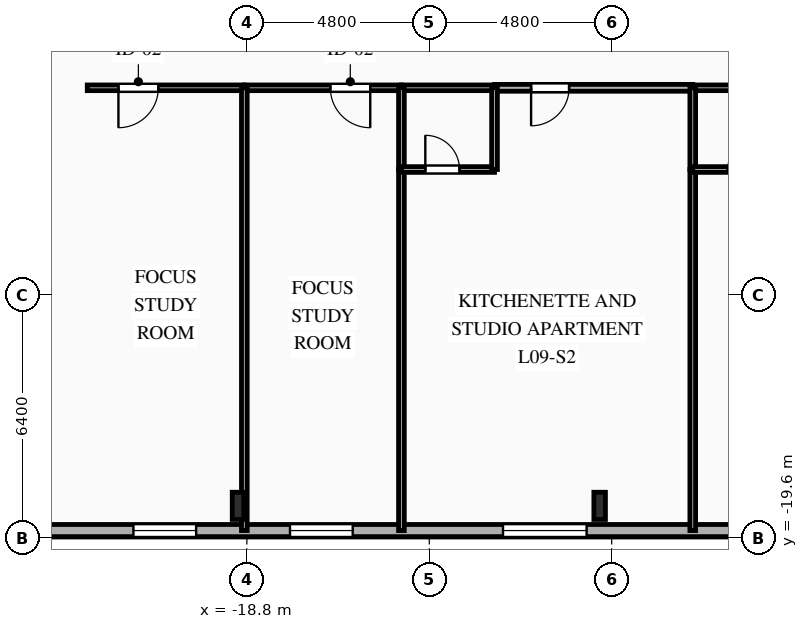
"""IFC4 building model, lengths in metres.
Left out: names, types, materials, properties, quantities, classifications, styles, units other than length and angle.
Written with IfcOpenShell. Run it as: python <this file> out.ifc"""

import sys

from ifc_helpers import new_model, si_unit, direction, frame, frame_2d, origin, origin_2d, place, context, subcontext, project, spatial, rectangle, i_section, extrude, element, fill, save


model = new_model("IFC4")
c1 = context("Model", 3, precision=1e-05, world=origin(), true_north=direction((0.0, 1.0)))
c2 = subcontext(c1, "Body", "Model", "MODEL_VIEW")
j1 = project(units=[si_unit("LENGTHUNIT", "METRE"), si_unit("PLANEANGLEUNIT", "RADIAN")], contexts=[c1])
p1 = place(None, origin())
s1 = spatial("IfcSite", under=j1, at=p1, CompositionType="ELEMENT")
p2 = place(p1, origin())
s2 = spatial("IfcBuilding", under=s1, at=p2, CompositionType="ELEMENT")
p3 = place(p2, frame((0.0, 0.0, 37.05)))
s3 = spatial("IfcBuildingStorey", under=s2, at=p3, CompositionType="ELEMENT", Elevation=37.05)
for number, where, z_axis, x_axis in (
    (1, (-19.033, -18.75, 0.0), (0.0, 0.0, 1.0), (1.0, 0.0, 0.0)),
    (2, (-9.517, -18.75, 0.0), (0.0, 0.0, 1.0), (1.0, 0.0, 0.0)),
):
    element("IfcColumn", number, at=place(p3, frame(where, z_axis=z_axis, x_axis=x_axis)), inside=s3, PredefinedType="COLUMN", context=c2, shape_type="SweptSolid", body=[
        extrude(i_section(OverallWidth=0.304, OverallDepth=0.716, WebThickness=0.021, FlangeThickness=0.04, FilletRadius=0.027, at=origin_2d()), origin(), (0.0, 0.0, 1.0), 3.35),
    ])
p4 = place(p3, frame((29.2, -19.4, 0.0), z_axis=(0.0, 0.0, 1.0), x_axis=(-1.0, 0.0, 0.0)))
e3 = element("IfcWall", 3, at=p4, inside=s3, PredefinedType="SOLIDWALL", context=c2, shape_type="SweptSolid", body=[
    extrude(rectangle(XDim=58.4, YDim=0.32, at=frame_2d((29.2, 0.0))), origin(), (0.0, 0.0, 1.0), 3.035),
])
p5 = place(p4, frame((3.055, 0.0, 0.85)))
e4 = element("IfcOpeningElement", 4, at=p5, cuts=e3, PredefinedType="OPENING", context=c2, shape_type="SweptSolid", body=[
    extrude(rectangle(XDim=1.65, YDim=1.85, at=frame_2d((0.825, 0.925))), frame((0.0, 0.17, 0.0), z_axis=(0.0, -1.0, 0.0), x_axis=(1.0, 0.0, 0.0)), (0.0, 0.0, 1.0), 0.34),
])
p6 = place(p4, frame((7.175, 0.0, 0.85)))
e5 = element("IfcOpeningElement", 5, at=p6, cuts=e3, PredefinedType="OPENING", context=c2, shape_type="SweptSolid", body=[
    extrude(rectangle(XDim=1.65, YDim=1.85, at=frame_2d((0.825, 0.925))), frame((0.0, 0.17, 0.0), z_axis=(0.0, -1.0, 0.0), x_axis=(1.0, 0.0, 0.0)), (0.0, 0.0, 1.0), 0.34),
])
p7 = place(p4, frame((10.695, 0.0, 0.85)))
e6 = element("IfcOpeningElement", 6, at=p7, cuts=e3, PredefinedType="OPENING", context=c2, shape_type="SweptSolid", body=[
    extrude(rectangle(XDim=1.65, YDim=1.85, at=frame_2d((0.825, 0.925))), frame((0.0, 0.17, 0.0), z_axis=(0.0, -1.0, 0.0), x_axis=(1.0, 0.0, 0.0)), (0.0, 0.0, 1.0), 0.34),
])
p8 = place(p4, frame((16.02, 0.0, 0.85)))
e7 = element("IfcOpeningElement", 7, at=p8, cuts=e3, PredefinedType="OPENING", context=c2, shape_type="SweptSolid", body=[
    extrude(rectangle(XDim=2.2, YDim=1.85, at=frame_2d((1.1, 0.925))), frame((0.0, 0.17, 0.0), z_axis=(0.0, -1.0, 0.0), x_axis=(1.0, 0.0, 0.0)), (0.0, 0.0, 1.0), 0.34),
])
p9 = place(p4, frame((23.7, 0.0, 0.85)))
e8 = element("IfcOpeningElement", 8, at=p9, cuts=e3, PredefinedType="OPENING", context=c2, shape_type="SweptSolid", body=[
    extrude(rectangle(XDim=2.2, YDim=1.85, at=frame_2d((1.1, 0.925))), frame((0.0, 0.17, 0.0), z_axis=(0.0, -1.0, 0.0), x_axis=(1.0, 0.0, 0.0)), (0.0, 0.0, 1.0), 0.34),
])
p10 = place(p4, frame((31.38, 0.0, 0.85)))
e9 = element("IfcOpeningElement", 9, at=p10, cuts=e3, PredefinedType="OPENING", context=c2, shape_type="SweptSolid", body=[
    extrude(rectangle(XDim=2.2, YDim=1.85, at=frame_2d((1.1, 0.925))), frame((0.0, 0.17, 0.0), z_axis=(0.0, -1.0, 0.0), x_axis=(1.0, 0.0, 0.0)), (0.0, 0.0, 1.0), 0.34),
])
p11 = place(p4, frame((39.06, 0.0, 0.85)))
e10 = element("IfcOpeningElement", 10, at=p11, cuts=e3, PredefinedType="OPENING", context=c2, shape_type="SweptSolid", body=[
    extrude(rectangle(XDim=2.2, YDim=1.85, at=frame_2d((1.1, 0.925))), frame((0.0, 0.17, 0.0), z_axis=(0.0, -1.0, 0.0), x_axis=(1.0, 0.0, 0.0)), (0.0, 0.0, 1.0), 0.34),
])
p12 = place(p4, frame((45.215, 0.0, 0.85)))
e11 = element("IfcOpeningElement", 11, at=p12, cuts=e3, PredefinedType="OPENING", context=c2, shape_type="SweptSolid", body=[
    extrude(rectangle(XDim=1.65, YDim=1.85, at=frame_2d((0.825, 0.925))), frame((0.0, 0.17, 0.0), z_axis=(0.0, -1.0, 0.0), x_axis=(1.0, 0.0, 0.0)), (0.0, 0.0, 1.0), 0.34),
])
p13 = place(p4, frame((49.335, 0.0, 0.85)))
e12 = element("IfcOpeningElement", 12, at=p13, cuts=e3, PredefinedType="OPENING", context=c2, shape_type="SweptSolid", body=[
    extrude(rectangle(XDim=1.65, YDim=1.85, at=frame_2d((0.825, 0.925))), frame((0.0, 0.17, 0.0), z_axis=(0.0, -1.0, 0.0), x_axis=(1.0, 0.0, 0.0)), (0.0, 0.0, 1.0), 0.34),
])
p14 = place(p3, frame((-18.866, -7.75, 0.0), z_axis=(0.0, 0.0, 1.0), x_axis=(-1.0, 0.0, 0.0)))
e13 = element("IfcWall", 13, at=p14, inside=s3, PredefinedType="PARTITIONING", context=c2, shape_type="SweptSolid", body=[
    extrude(rectangle(XDim=4.134, YDim=0.15, at=frame_2d((2.067, 0.0))), origin(), (0.0, 0.0, 1.0), 3.035),
])
p15 = place(p14, frame((2.263, 0.0, 0.0)))
e14 = element("IfcOpeningElement", 14, at=p15, cuts=e13, PredefinedType="OPENING", context=c2, shape_type="SweptSolid", body=[
    extrude(rectangle(XDim=1.05, YDim=2.15, at=frame_2d((0.525, 1.075))), frame((0.0, 0.085, 0.0), z_axis=(0.0, -1.0, 0.0), x_axis=(1.0, 0.0, 0.0)), (0.0, 0.0, 1.0), 0.17),
])
p16 = place(p3, frame((-14.733, -7.75, 0.0), z_axis=(0.0, 0.0, 1.0), x_axis=(-1.0, 0.0, 0.0)))
e15 = element("IfcWall", 15, at=p16, inside=s3, PredefinedType="PARTITIONING", context=c2, shape_type="SweptSolid", body=[
    extrude(rectangle(XDim=4.134, YDim=0.15, at=frame_2d((2.067, 0.0))), origin(), (0.0, 0.0, 1.0), 3.035),
])
p17 = place(p16, frame((0.82, 0.0, 0.0)))
e16 = element("IfcOpeningElement", 16, at=p17, cuts=e15, PredefinedType="OPENING", context=c2, shape_type="SweptSolid", body=[
    extrude(rectangle(XDim=1.05, YDim=2.15, at=frame_2d((0.525, 1.075))), frame((0.0, 0.085, 0.0), z_axis=(0.0, -1.0, 0.0), x_axis=(1.0, 0.0, 0.0)), (0.0, 0.0, 1.0), 0.17),
])
p18 = place(p3, frame((-7.067, -7.75, 0.0), z_axis=(0.0, 0.0, 1.0), x_axis=(-1.0, 0.0, 0.0)))
e17 = element("IfcWall", 17, at=p18, inside=s3, PredefinedType="PARTITIONING", context=c2, shape_type="SweptSolid", body=[
    extrude(rectangle(XDim=5.216, YDim=0.18, at=frame_2d((2.608, 0.0))), origin(), (0.0, 0.0, 1.0), 3.035),
])
p19 = place(p18, frame((3.254, 0.0, 0.0)))
e18 = element("IfcOpeningElement", 18, at=p19, cuts=e17, PredefinedType="OPENING", context=c2, shape_type="SweptSolid", body=[
    extrude(rectangle(XDim=1.0, YDim=2.15, at=frame_2d((0.5, 1.075))), frame((0.0, 0.1, 0.0), z_axis=(0.0, -1.0, 0.0), x_axis=(1.0, 0.0, 0.0)), (0.0, 0.0, 1.0), 0.2),
])
for number, where, z_axis, x_axis in (
    (19, (-12.283, -7.75, 0.0), (0.0, 0.0, 1.0), (-1.0, 0.0, 0.0)),
    (20, (-4.617, -7.75, 0.0), (0.0, 0.0, 1.0), (-1.0, 0.0, 0.0)),
):
    element("IfcWall", number, at=place(p3, frame(where, z_axis=z_axis, x_axis=x_axis)), inside=s3, PredefinedType="PLUMBINGWALL", context=c2, shape_type="SweptSolid", body=[
        extrude(rectangle(XDim=2.45, YDim=0.15, at=frame_2d((1.225, 0.0))), origin(), (0.0, 0.0, 1.0), 3.035),
    ])
p20 = place(p3, frame((-18.866, -7.75, 0.0), z_axis=(0.0, 0.0, 1.0), x_axis=(0.0, -1.0, 0.0)))
e21 = element("IfcWall", 21, at=p20, inside=s3, PredefinedType="PARTITIONING", context=c2, shape_type="SweptSolid", body=[
    extrude(rectangle(XDim=11.65, YDim=0.15, at=frame_2d((5.825, 0.0))), origin(), (0.0, 0.0, 1.0), 2.52),
])
p21 = place(p3, frame((-14.733, -9.9, 0.0), z_axis=(0.0, 0.0, 1.0), x_axis=(0.0, -1.0, 0.0)))
e22 = element("IfcWall", 22, at=p21, inside=s3, PredefinedType="PARTITIONING", context=c2, shape_type="SweptSolid", body=[
    extrude(rectangle(XDim=9.5, YDim=0.15, at=frame_2d((4.75, 0.0))), origin(), (0.0, 0.0, 1.0), 3.035),
])
p22 = place(p3, frame((-14.733, -7.75, 0.0), z_axis=(0.0, 0.0, 1.0), x_axis=(0.0, -1.0, 0.0)))
e23 = element("IfcWall", 23, at=p22, inside=s3, PredefinedType="PLUMBINGWALL", context=c2, shape_type="SweptSolid", body=[
    extrude(rectangle(XDim=2.15, YDim=0.15, at=frame_2d((1.075, 0.0))), origin(), (0.0, 0.0, 1.0), 3.035),
])
p23 = place(p3, frame((-14.733, -9.9, 0.0), z_axis=(0.0, 0.0, 1.0), x_axis=(1.0, 0.0, 0.0)))
e24 = element("IfcWall", 24, at=p23, inside=s3, PredefinedType="PLUMBINGWALL", context=c2, shape_type="SweptSolid", body=[
    extrude(rectangle(XDim=2.45, YDim=0.15, at=frame_2d((1.225, 0.0))), origin(), (0.0, 0.0, 1.0), 3.035),
])
p24 = place(p23, frame((0.629, 0.0, 0.0)))
e25 = element("IfcOpeningElement", 25, at=p24, cuts=e24, PredefinedType="OPENING", context=c2, shape_type="SweptSolid", body=[
    extrude(rectangle(XDim=0.9, YDim=2.1, at=frame_2d((0.45, 1.05))), frame((0.0, 0.085, 0.0), z_axis=(0.0, -1.0, 0.0), x_axis=(1.0, 0.0, 0.0)), (0.0, 0.0, 1.0), 0.17),
])
p25 = place(p3, frame((-12.283, -9.9, 0.0), z_axis=(0.0, 0.0, 1.0), x_axis=(0.0, 1.0, 0.0)))
e26 = element("IfcWall", 26, at=p25, inside=s3, PredefinedType="PLUMBINGWALL", context=c2, shape_type="SweptSolid", body=[
    extrude(rectangle(XDim=2.15, YDim=0.15, at=frame_2d((1.075, 0.0))), origin(), (0.0, 0.0, 1.0), 3.035),
])
p26 = place(p3, frame((-7.067, -9.9, 0.0), z_axis=(0.0, 0.0, 1.0), x_axis=(0.0, -1.0, 0.0)))
e27 = element("IfcWall", 27, at=p26, inside=s3, PredefinedType="PARTITIONING", context=c2, shape_type="SweptSolid", body=[
    extrude(rectangle(XDim=9.5, YDim=0.15, at=frame_2d((4.75, 0.0))), origin(), (0.0, 0.0, 1.0), 3.035),
])
p27 = place(p3, frame((-7.067, -7.75, 0.0), z_axis=(0.0, 0.0, 1.0), x_axis=(0.0, -1.0, 0.0)))
e28 = element("IfcWall", 28, at=p27, inside=s3, PredefinedType="PLUMBINGWALL", context=c2, shape_type="SweptSolid", body=[
    extrude(rectangle(XDim=2.15, YDim=0.15, at=frame_2d((1.075, 0.0))), origin(), (0.0, 0.0, 1.0), 3.035),
])
p28 = place(p3, frame((-7.067, -9.9, 0.0), z_axis=(0.0, 0.0, 1.0), x_axis=(1.0, 0.0, 0.0)))
e29 = element("IfcWall", 29, at=p28, inside=s3, PredefinedType="PLUMBINGWALL", context=c2, shape_type="SweptSolid", body=[
    extrude(rectangle(XDim=2.45, YDim=0.15, at=frame_2d((1.225, 0.0))), origin(), (0.0, 0.0, 1.0), 3.035),
])
p29 = place(p28, frame((0.921, 0.0, 0.0)))
e30 = element("IfcOpeningElement", 30, at=p29, cuts=e29, PredefinedType="OPENING", context=c2, shape_type="SweptSolid", body=[
    extrude(rectangle(XDim=0.9, YDim=2.1, at=frame_2d((0.45, 1.05))), frame((0.0, 0.085, 0.0), z_axis=(0.0, -1.0, 0.0), x_axis=(1.0, 0.0, 0.0)), (0.0, 0.0, 1.0), 0.17),
])
p30 = place(p11, origin())
e31 = element("IfcWindow", 31, at=p30, inside=s3, PartitioningType="SINGLE_PANEL", PredefinedType="WINDOW", context=c2, shape_type="SweptSolid", body=[
    extrude(rectangle(XDim=2.2, YDim=1.85, at=frame_2d((1.1, 0.925))), frame((0.0, 0.03, 0.0), z_axis=(0.0, -1.0, 0.0), x_axis=(1.0, 0.0, 0.0)), (0.0, 0.0, 1.0), 0.06),
])
fill(e10, e31)
p31 = place(p12, origin())
e32 = element("IfcWindow", 32, at=p31, inside=s3, PartitioningType="SINGLE_PANEL", PredefinedType="WINDOW", context=c2, shape_type="SweptSolid", body=[
    extrude(rectangle(XDim=1.65, YDim=1.85, at=frame_2d((0.825, 0.925))), frame((0.0, 0.03, 0.0), z_axis=(0.0, -1.0, 0.0), x_axis=(1.0, 0.0, 0.0)), (0.0, 0.0, 1.0), 0.06),
])
fill(e11, e32)
p32 = place(p13, origin())
e33 = element("IfcWindow", 33, at=p32, inside=s3, PartitioningType="SINGLE_PANEL", PredefinedType="WINDOW", context=c2, shape_type="SweptSolid", body=[
    extrude(rectangle(XDim=1.65, YDim=1.85, at=frame_2d((0.825, 0.925))), frame((0.0, 0.03, 0.0), z_axis=(0.0, -1.0, 0.0), x_axis=(1.0, 0.0, 0.0)), (0.0, 0.0, 1.0), 0.06),
])
fill(e12, e33)
p33 = place(p15, origin())
e34 = element("IfcDoor", 34, at=p33, inside=s3, OperationType="SINGLE_SWING_RIGHT", PredefinedType="DOOR", context=c2, shape_type="SweptSolid", body=[
    extrude(rectangle(XDim=1.05, YDim=2.15, at=frame_2d((0.525, 1.075))), frame((0.0, 0.025, 0.0), z_axis=(0.0, -1.0, 0.0), x_axis=(1.0, 0.0, 0.0)), (0.0, 0.0, 1.0), 0.05),
])
fill(e14, e34)
p34 = place(p17, origin())
e35 = element("IfcDoor", 35, at=p34, inside=s3, OperationType="SINGLE_SWING_LEFT", PredefinedType="DOOR", context=c2, shape_type="SweptSolid", body=[
    extrude(rectangle(XDim=1.05, YDim=2.15, at=frame_2d((0.525, 1.075))), frame((0.0, 0.025, 0.0), z_axis=(0.0, -1.0, 0.0), x_axis=(1.0, 0.0, 0.0)), (0.0, 0.0, 1.0), 0.05),
])
fill(e16, e35)
p35 = place(p19, origin())
e36 = element("IfcDoor", 36, at=p35, inside=s3, OperationType="SINGLE_SWING_RIGHT", PredefinedType="DOOR", context=c2, shape_type="SweptSolid", body=[
    extrude(rectangle(XDim=1.0, YDim=2.15, at=frame_2d((0.5, 1.075))), frame((0.0, 0.025, 0.0), z_axis=(0.0, -1.0, 0.0), x_axis=(1.0, 0.0, 0.0)), (0.0, 0.0, 1.0), 0.05),
])
fill(e18, e36)
p36 = place(p24, origin())
e37 = element("IfcDoor", 37, at=p36, inside=s3, OperationType="SINGLE_SWING_LEFT", PredefinedType="DOOR", context=c2, shape_type="SweptSolid", body=[
    extrude(rectangle(XDim=0.9, YDim=2.1, at=frame_2d((0.45, 1.05))), frame((0.0, 0.025, 0.0), z_axis=(0.0, -1.0, 0.0), x_axis=(1.0, 0.0, 0.0)), (0.0, 0.0, 1.0), 0.05),
])
fill(e25, e37)
p37 = place(p29, origin())
e38 = element("IfcDoor", 38, at=p37, inside=s3, OperationType="SINGLE_SWING_RIGHT", PredefinedType="DOOR", context=c2, shape_type="SweptSolid", body=[
    extrude(rectangle(XDim=0.9, YDim=2.1, at=frame_2d((0.45, 1.05))), frame((0.0, 0.025, 0.0), z_axis=(0.0, -1.0, 0.0), x_axis=(1.0, 0.0, 0.0)), (0.0, 0.0, 1.0), 0.05),
])
fill(e30, e38)
save(model, sys.argv[1])
